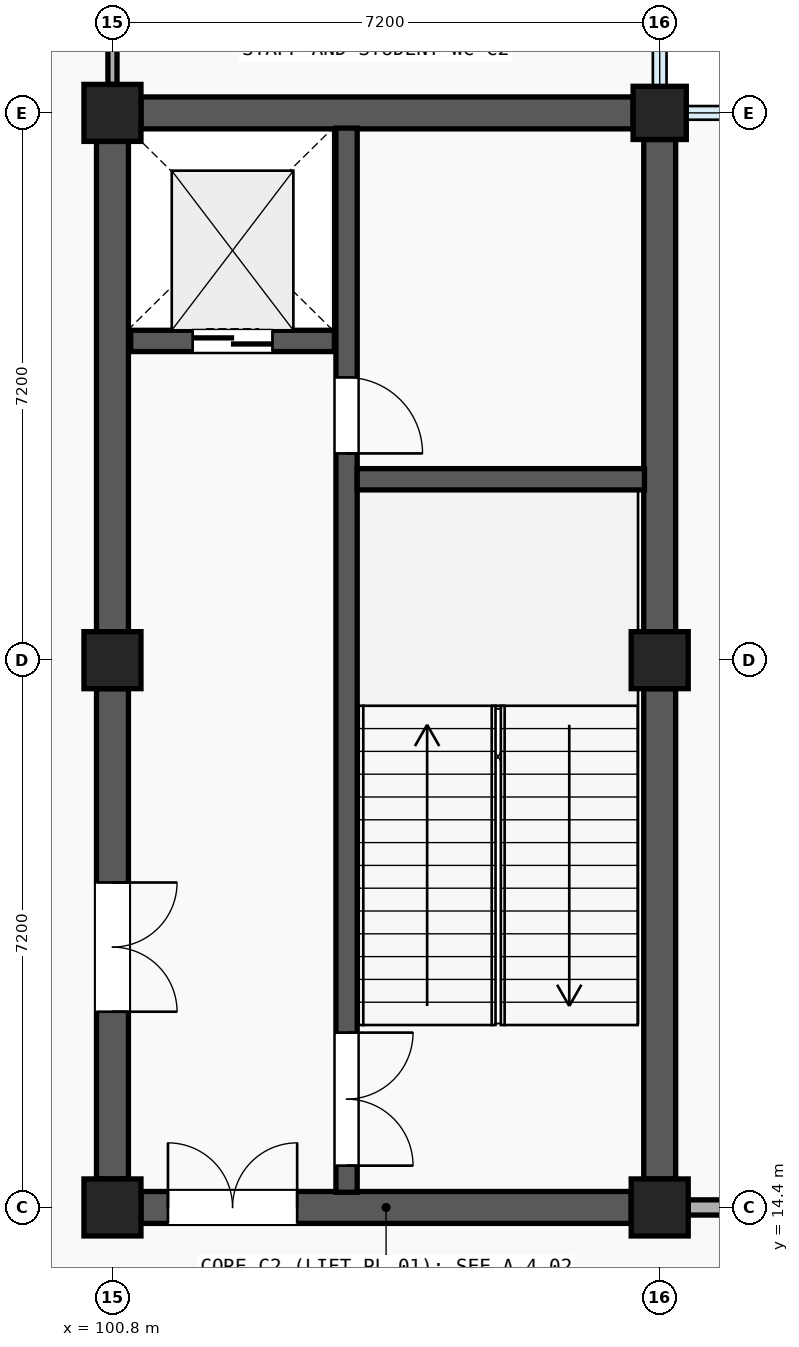
"""IFC4 building model, lengths in metres.
Left out: names, types, materials, properties, quantities, classifications, styles, units other than length and angle.
Written with IfcOpenShell. Run it as: python <this file> out.ifc"""

import sys

from ifc_helpers import new_model, si_unit, direction, frame, frame_2d, origin, origin_2d, place, context, subcontext, project, spatial, rectangle, extrude, element, fill, save


model = new_model("IFC4")
c1 = context("Model", 3, precision=1e-05, world=origin(), true_north=direction((0.0, 1.0)))
c2 = subcontext(c1, "Body", "Model", "MODEL_VIEW")
j1 = project(units=[si_unit("LENGTHUNIT", "METRE"), si_unit("PLANEANGLEUNIT", "RADIAN")], contexts=[c1])
p1 = place(None, origin())
s1 = spatial("IfcSite", under=j1, at=p1, CompositionType="ELEMENT")
p2 = place(p1, origin())
s2 = spatial("IfcBuilding", under=s1, at=p2, CompositionType="ELEMENT")
p3 = place(p2, frame((0.0, 0.0, 9.6)))
s3 = spatial("IfcBuildingStorey", under=s2, at=p3, CompositionType="ELEMENT", Elevation=9.6)
for number, where, z_axis, x_axis in (
    (1, (100.8, 14.4, 0.0), (0.0, 0.0, 1.0), (1.0, 0.0, 0.0)),
    (2, (100.8, 21.6, 0.0), (0.0, 0.0, 1.0), (1.0, 0.0, 0.0)),
    (3, (100.8, 28.8, 0.0), (0.0, 0.0, 1.0), (1.0, 0.0, 0.0)),
    (4, (108.0, 14.4, 0.0), (0.0, 0.0, 1.0), (1.0, 0.0, 0.0)),
    (5, (108.0, 21.6, 0.0), (0.0, 0.0, 1.0), (1.0, 0.0, 0.0)),
):
    element("IfcColumn", number, at=place(p3, frame(where, z_axis=z_axis, x_axis=x_axis)), inside=s3, PredefinedType="COLUMN", context=c2, shape_type="SweptSolid", body=[
        extrude(rectangle(XDim=0.75, YDim=0.75, at=origin_2d()), origin(), (0.0, 0.0, 1.0), 4.8),
    ])
p4 = place(p3, frame((108.0, 28.8, 0.0), z_axis=(0.0, 0.0, 1.0), x_axis=(1.0, 0.0, 0.0)))
e6 = element("IfcColumn", 6, at=p4, inside=s3, PredefinedType="COLUMN", context=c2, shape_type="SweptSolid", body=[
    extrude(rectangle(XDim=0.7, YDim=0.7, at=origin_2d()), origin(), (0.0, 0.0, 1.0), 4.8),
])
p5 = place(p3, frame((100.8, 14.775, 0.0), z_axis=(0.0, 0.0, 1.0), x_axis=(0.0, 1.0, 0.0)))
e7 = element("IfcWall", 7, at=p5, inside=s3, PredefinedType="SHEAR", context=c2, shape_type="SweptSolid", body=[
    extrude(rectangle(XDim=6.45, YDim=0.42, at=frame_2d((3.225, 0.0))), origin(), (0.0, 0.0, 1.0), 3.74),
])
p6 = place(p5, frame((2.2, 0.0, 0.0)))
e8 = element("IfcOpeningElement", 8, at=p6, cuts=e7, PredefinedType="OPENING", context=c2, shape_type="SweptSolid", body=[
    extrude(rectangle(XDim=1.7, YDim=2.25, at=frame_2d((0.85, 1.125))), frame((0.0, 0.222, 0.0), z_axis=(0.0, -1.0, 0.0), x_axis=(1.0, 0.0, 0.0)), (0.0, 0.0, 1.0), 0.444),
])
p7 = place(p3, frame((100.8, 21.975, 0.0), z_axis=(0.0, 0.0, 1.0), x_axis=(0.0, 1.0, 0.0)))
e9 = element("IfcWall", 9, at=p7, inside=s3, PredefinedType="SHEAR", context=c2, shape_type="SweptSolid", body=[
    extrude(rectangle(XDim=6.45, YDim=0.42, at=frame_2d((3.225, 0.0))), origin(), (0.0, 0.0, 1.0), 3.74),
])
p8 = place(p3, frame((108.0, 14.775, 0.0), z_axis=(0.0, 0.0, 1.0), x_axis=(0.0, 1.0, 0.0)))
e10 = element("IfcWall", 10, at=p8, inside=s3, PredefinedType="SHEAR", context=c2, shape_type="SweptSolid", body=[
    extrude(rectangle(XDim=6.45, YDim=0.42, at=frame_2d((3.225, 0.0))), origin(), (0.0, 0.0, 1.0), 3.74),
])
p9 = place(p3, frame((108.0, 21.975, 0.0), z_axis=(0.0, 0.0, 1.0), x_axis=(0.0, 1.0, 0.0)))
e11 = element("IfcWall", 11, at=p9, inside=s3, PredefinedType="SHEAR", context=c2, shape_type="SweptSolid", body=[
    extrude(rectangle(XDim=6.475, YDim=0.42, at=frame_2d((3.237, 0.0))), origin(), (0.0, 0.0, 1.0), 3.74),
])
p10 = place(p3, frame((101.175, 14.4, 0.0), z_axis=(0.0, 0.0, 1.0), x_axis=(1.0, 0.0, 0.0)))
e12 = element("IfcWall", 12, at=p10, inside=s3, PredefinedType="SHEAR", context=c2, shape_type="SweptSolid", body=[
    extrude(rectangle(XDim=6.45, YDim=0.42, at=frame_2d((3.225, 0.0))), origin(), (0.0, 0.0, 1.0), 3.81),
])
p11 = place(p10, frame((0.355, 0.0, 0.0)))
e13 = element("IfcOpeningElement", 13, at=p11, cuts=e12, PredefinedType="OPENING", context=c2, shape_type="SweptSolid", body=[
    extrude(rectangle(XDim=1.7, YDim=2.25, at=frame_2d((0.85, 1.125))), frame((0.0, 0.222, 0.0), z_axis=(0.0, -1.0, 0.0), x_axis=(1.0, 0.0, 0.0)), (0.0, 0.0, 1.0), 0.444),
])
p12 = place(p3, frame((101.175, 28.8, 0.0), z_axis=(0.0, 0.0, 1.0), x_axis=(1.0, 0.0, 0.0)))
e14 = element("IfcWall", 14, at=p12, inside=s3, PredefinedType="SHEAR", context=c2, shape_type="SweptSolid", body=[
    extrude(rectangle(XDim=6.475, YDim=0.42, at=frame_2d((3.237, 0.0))), origin(), (0.0, 0.0, 1.0), 3.74),
])
p13 = place(p3, frame((103.88, 14.6, 0.0), z_axis=(0.0, 0.0, 1.0), x_axis=(0.0, 1.0, 0.0)))
e15 = element("IfcWall", 15, at=p13, inside=s3, PredefinedType="SHEAR", context=c2, shape_type="SweptSolid", body=[
    extrude(rectangle(XDim=14.0, YDim=0.28, at=frame_2d((7.0, 0.0))), origin(), (0.0, 0.0, 1.0), 4.51),
])
p14 = place(p13, frame((0.35, 0.0, 0.0)))
e16 = element("IfcOpeningElement", 16, at=p14, cuts=e15, PredefinedType="OPENING", context=c2, shape_type="SweptSolid", body=[
    extrude(rectangle(XDim=1.75, YDim=2.15, at=frame_2d((0.875, 1.075))), frame((0.0, 0.152, 0.0), z_axis=(0.0, -1.0, 0.0), x_axis=(1.0, 0.0, 0.0)), (0.0, 0.0, 1.0), 0.304),
])
p15 = place(p13, frame((9.72, 0.0, 0.0)))
e17 = element("IfcOpeningElement", 17, at=p15, cuts=e15, PredefinedType="OPENING", context=c2, shape_type="SweptSolid", body=[
    extrude(rectangle(XDim=1.0, YDim=2.15, at=frame_2d((0.5, 1.075))), frame((0.0, 0.152, 0.0), z_axis=(0.0, -1.0, 0.0), x_axis=(1.0, 0.0, 0.0)), (0.0, 0.0, 1.0), 0.304),
])
p16 = place(p3, frame((104.02, 23.98, 0.0), z_axis=(0.0, 0.0, 1.0), x_axis=(1.0, 0.0, 0.0)))
e18 = element("IfcWall", 18, at=p16, inside=s3, PredefinedType="SHEAR", context=c2, shape_type="SweptSolid", body=[
    extrude(rectangle(XDim=3.78, YDim=0.28, at=frame_2d((1.89, 0.0))), origin(), (0.0, 0.0, 1.0), 4.51),
])
p17 = place(p3, frame((101.04, 25.8, 0.0), z_axis=(0.0, 0.0, 1.0), x_axis=(1.0, 0.0, 0.0)))
e19 = element("IfcWall", 19, at=p17, inside=s3, PredefinedType="SHEAR", context=c2, shape_type="SweptSolid", body=[
    extrude(rectangle(XDim=2.68, YDim=0.28, at=frame_2d((1.34, 0.0))), origin(), (0.0, 0.0, 1.0), 4.51),
])
p18 = place(p17, frame((0.815, 0.0, 0.0)))
e20 = element("IfcOpeningElement", 20, at=p18, cuts=e19, PredefinedType="OPENING", context=c2, shape_type="SweptSolid", body=[
    extrude(rectangle(XDim=1.05, YDim=2.2, at=frame_2d((0.525, 1.1))), frame((0.0, 0.152, 0.0), z_axis=(0.0, -1.0, 0.0), x_axis=(1.0, 0.0, 0.0)), (0.0, 0.0, 1.0), 0.304),
])
p19 = place(p3, frame((108.375, 14.4, 0.0), z_axis=(0.0, 0.0, 1.0), x_axis=(1.0, 0.0, 0.0)))
e21 = element("IfcWall", 21, at=p19, inside=s3, PredefinedType="PARTITIONING", context=c2, shape_type="SweptSolid", body=[
    extrude(rectangle(XDim=6.45, YDim=0.2, at=frame_2d((3.225, 0.0))), origin(), (0.0, 0.0, 1.0), 3.74),
])
p20 = place(p19, frame((2.695, 0.0, 0.0)))
e22 = element("IfcOpeningElement", 22, at=p20, cuts=e21, PredefinedType="OPENING", context=c2, shape_type="SweptSolid", body=[
    extrude(rectangle(XDim=1.06, YDim=2.16, at=frame_2d((0.53, 1.08))), frame((0.0, 0.112, 0.0), z_axis=(0.0, -1.0, 0.0), x_axis=(1.0, 0.0, 0.0)), (0.0, 0.0, 1.0), 0.224),
])
p21 = place(p3, frame((100.8, 29.175, 0.0), z_axis=(0.0, 0.0, 1.0), x_axis=(0.0, 1.0, 0.0)))
e23 = element("IfcWall", 23, at=p21, inside=s3, PredefinedType="MOVABLE", context=c2, shape_type="SweptSolid", body=[
    extrude(rectangle(XDim=6.45, YDim=0.12, at=frame_2d((3.225, 0.0))), origin(), (0.0, 0.0, 1.0), 3.74),
])
p22 = place(p21, frame((2.585, 0.0, 0.0)))
e24 = element("IfcOpeningElement", 24, at=p22, cuts=e23, PredefinedType="OPENING", context=c2, shape_type="SweptSolid", body=[
    extrude(rectangle(XDim=1.28, YDim=2.28, at=frame_2d((0.64, 1.14))), frame((0.0, 0.072, 0.0), z_axis=(0.0, -1.0, 0.0), x_axis=(1.0, 0.0, 0.0)), (0.0, 0.0, 1.0), 0.144),
])
p23 = place(p6, frame((1.7, 0.0, 0.0), z_axis=(0.0, 0.0, 1.0), x_axis=(-1.0, 0.0, 0.0)))
e25 = element("IfcDoor", 25, at=p23, inside=s3, OperationType="DOUBLE_DOOR_SINGLE_SWING", PredefinedType="DOOR", context=c2, shape_type="SweptSolid", body=[
    extrude(rectangle(XDim=1.7, YDim=2.25, at=frame_2d((0.85, 1.125))), frame((0.0, 0.025, 0.0), z_axis=(0.0, -1.0, 0.0), x_axis=(1.0, 0.0, 0.0)), (0.0, 0.0, 1.0), 0.05),
])
fill(e8, e25)
p24 = place(p11, origin())
e26 = element("IfcDoor", 26, at=p24, inside=s3, OperationType="DOUBLE_DOOR_SINGLE_SWING", PredefinedType="DOOR", context=c2, shape_type="SweptSolid", body=[
    extrude(rectangle(XDim=1.7, YDim=2.25, at=frame_2d((0.85, 1.125))), frame((0.0, 0.025, 0.0), z_axis=(0.0, -1.0, 0.0), x_axis=(1.0, 0.0, 0.0)), (0.0, 0.0, 1.0), 0.05),
])
fill(e13, e26)
p25 = place(p14, frame((1.75, 0.0, 0.0), z_axis=(0.0, 0.0, 1.0), x_axis=(-1.0, 0.0, 0.0)))
e27 = element("IfcDoor", 27, at=p25, inside=s3, OperationType="DOUBLE_DOOR_SINGLE_SWING", PredefinedType="DOOR", context=c2, shape_type="SweptSolid", body=[
    extrude(rectangle(XDim=1.75, YDim=2.15, at=frame_2d((0.875, 1.075))), frame((0.0, 0.025, 0.0), z_axis=(0.0, -1.0, 0.0), x_axis=(1.0, 0.0, 0.0)), (0.0, 0.0, 1.0), 0.05),
])
fill(e16, e27)
p26 = place(p15, frame((1.0, 0.0, 0.0), z_axis=(0.0, 0.0, 1.0), x_axis=(-1.0, 0.0, 0.0)))
e28 = element("IfcDoor", 28, at=p26, inside=s3, OperationType="SINGLE_SWING_RIGHT", PredefinedType="DOOR", context=c2, shape_type="SweptSolid", body=[
    extrude(rectangle(XDim=1.0, YDim=2.15, at=frame_2d((0.5, 1.075))), frame((0.0, 0.025, 0.0), z_axis=(0.0, -1.0, 0.0), x_axis=(1.0, 0.0, 0.0)), (0.0, 0.0, 1.0), 0.05),
])
fill(e17, e28)
p27 = place(p18, frame((1.05, 0.0, 0.0), z_axis=(0.0, 0.0, 1.0), x_axis=(-1.0, 0.0, 0.0)))
e29 = element("IfcDoor", 29, at=p27, inside=s3, OperationType="DOUBLE_DOOR_SLIDING", PredefinedType="DOOR", context=c2, shape_type="SweptSolid", body=[
    extrude(rectangle(XDim=1.05, YDim=2.2, at=frame_2d((0.525, 1.1))), frame((0.0, 0.025, 0.0), z_axis=(0.0, -1.0, 0.0), x_axis=(1.0, 0.0, 0.0)), (0.0, 0.0, 1.0), 0.05),
])
fill(e20, e29)
save(model, sys.argv[1])
